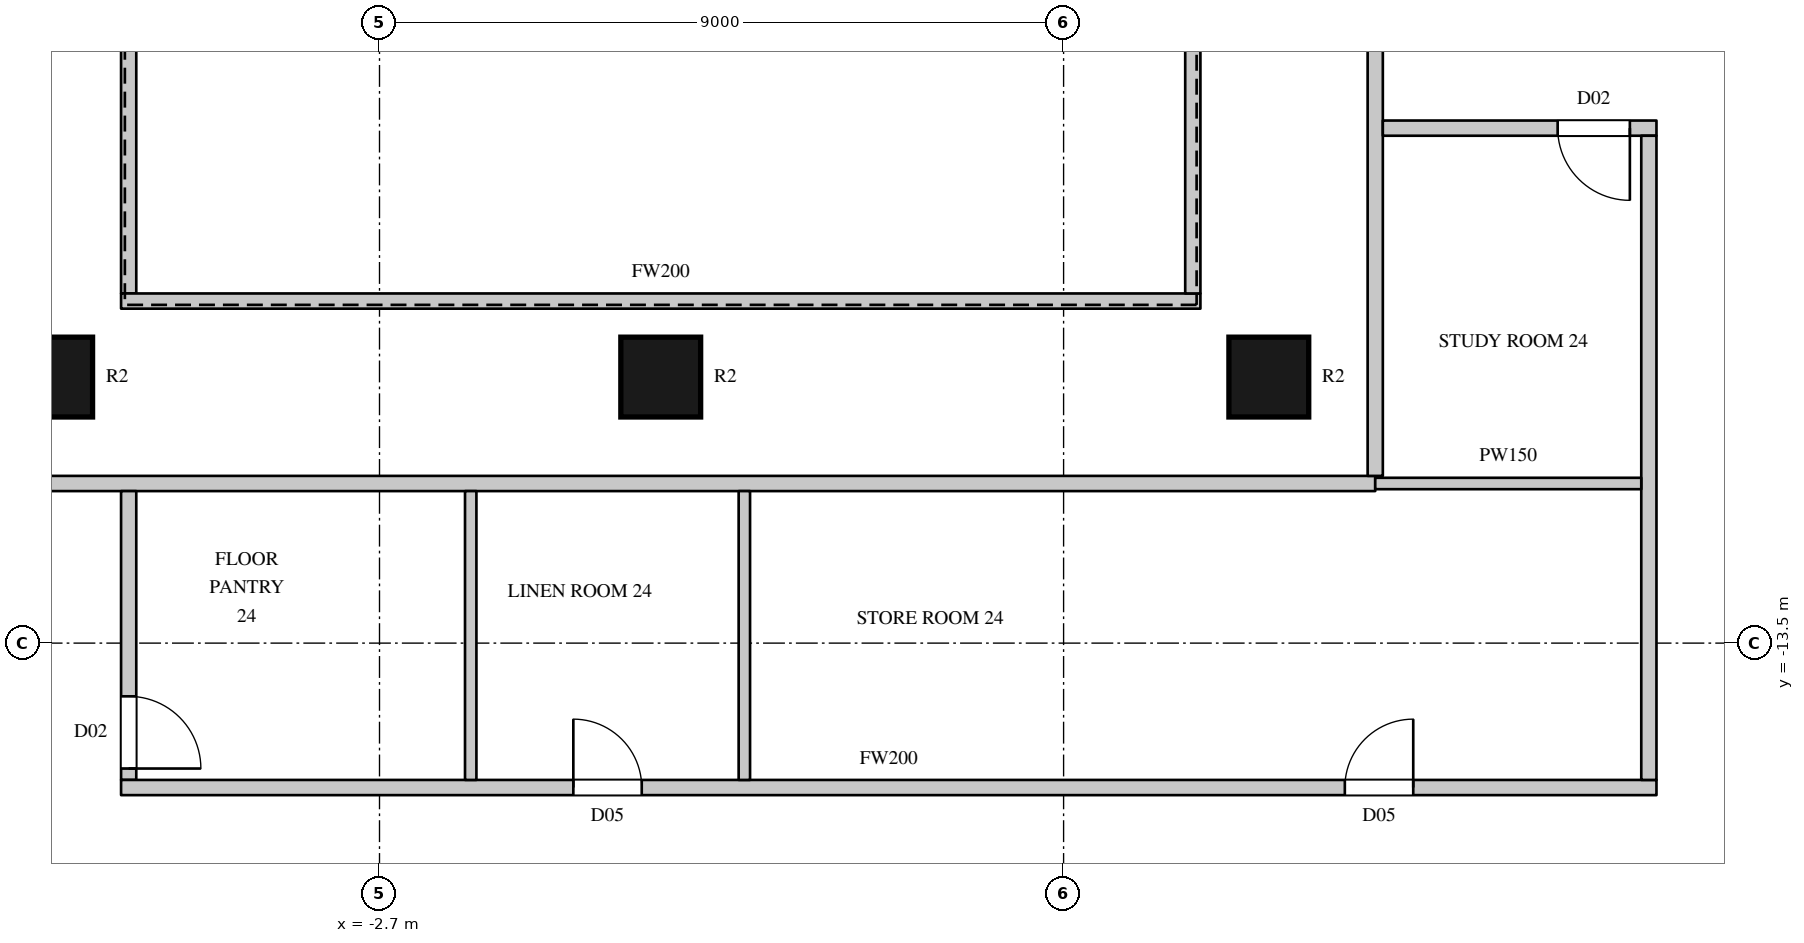
"""IFC4 building model, lengths in metres.
Left out: names, types, materials, properties, quantities, classifications, styles, units other than length and angle.
Written with IfcOpenShell. Run it as: python <this file> out.ifc"""

import sys

from ifc_helpers import new_model, si_unit, direction, frame, frame_2d, origin, origin_2d, place, context, subcontext, project, spatial, rectangle, circle, extrude, element, fill, save


model = new_model("IFC4")
c1 = context("Model", 3, precision=1e-05, world=origin(), true_north=direction((0.0, 1.0)))
c2 = subcontext(c1, "Body", "Model", "MODEL_VIEW")
j1 = project(units=[si_unit("LENGTHUNIT", "METRE"), si_unit("PLANEANGLEUNIT", "RADIAN")], contexts=[c1])
p1 = place(None, origin())
s1 = spatial("IfcSite", under=j1, at=p1, CompositionType="ELEMENT")
p2 = place(p1, origin())
s2 = spatial("IfcBuilding", under=s1, at=p2, CompositionType="ELEMENT")
p3 = place(p2, frame((0.0, 0.0, 116.7)))
s3 = spatial("IfcBuildingStorey", under=s2, at=p3, CompositionType="ELEMENT", Elevation=116.7)
for number, where, z_axis, x_axis in (
    (1, (-7.0, -10.0, 0.0), (0.0, 0.0, 1.0), (1.0, 0.0, 0.0)),
    (2, (1.0, -10.0, 0.0), (0.0, 0.0, 1.0), (1.0, 0.0, 0.0)),
    (3, (9.0, -10.0, 0.0), (0.0, 0.0, 1.0), (1.0, 0.0, 0.0)),
):
    element("IfcColumn", number, at=place(p3, frame(where, z_axis=z_axis, x_axis=x_axis)), inside=s3, PredefinedType="COLUMN", context=c2, shape_type="SweptSolid", body=[
        extrude(circle(Radius=0.525, at=origin_2d()), origin(), (0.0, 0.0, 1.0), 3.6),
    ])
p4 = place(p3, frame((-8.5, -11.4, 0.0), z_axis=(0.0, 0.0, 1.0), x_axis=(1.0, 0.0, 0.0)))
e4 = element("IfcWall", 4, at=p4, inside=s3, PredefinedType="PARTITIONING", context=c2, shape_type="SweptSolid", body=[
    extrude(rectangle(XDim=18.9, YDim=0.2, at=frame_2d((9.45, 0.0))), origin(), (0.0, 0.0, 1.0), 3.3),
])
p5 = place(p3, frame((-6.0, -15.3, 0.0), z_axis=(0.0, 0.0, 1.0), x_axis=(0.0, 1.0, 0.0)))
e5 = element("IfcWall", 5, at=p5, inside=s3, PredefinedType="PARTITIONING", context=c2, shape_type="SweptSolid", body=[
    extrude(rectangle(XDim=3.8, YDim=0.2, at=frame_2d((1.9, 0.0))), origin(), (0.0, 0.0, 1.0), 3.3),
])
p6 = place(p5, frame((0.15, 0.0, 0.0)))
e6 = element("IfcOpeningElement", 6, at=p6, cuts=e5, PredefinedType="OPENING", context=c2, shape_type="SweptSolid", body=[
    extrude(rectangle(XDim=0.95, YDim=2.2, at=frame_2d((0.475, 1.1))), frame((0.0, 0.11, 0.0), z_axis=(0.0, -1.0, 0.0), x_axis=(1.0, 0.0, 0.0)), (0.0, 0.0, 1.0), 0.22),
])
p7 = place(p3, frame((-6.1, -15.4, 0.0), z_axis=(0.0, 0.0, 1.0), x_axis=(1.0, 0.0, 0.0)))
e7 = element("IfcWall", 7, at=p7, inside=s3, PredefinedType="PARTITIONING", context=c2, shape_type="SweptSolid", body=[
    extrude(rectangle(XDim=20.2, YDim=0.2, at=frame_2d((10.1, 0.0))), origin(), (0.0, 0.0, 1.0), 3.3),
])
p8 = place(p7, frame((5.95, 0.0, 0.0)))
e8 = element("IfcOpeningElement", 8, at=p8, cuts=e7, PredefinedType="OPENING", context=c2, shape_type="SweptSolid", body=[
    extrude(rectangle(XDim=0.9, YDim=2.2, at=frame_2d((0.45, 1.1))), frame((0.0, 0.11, 0.0), z_axis=(0.0, -1.0, 0.0), x_axis=(1.0, 0.0, 0.0)), (0.0, 0.0, 1.0), 0.22),
])
p9 = place(p7, frame((16.1, 0.0, 0.0)))
e9 = element("IfcOpeningElement", 9, at=p9, cuts=e7, PredefinedType="OPENING", context=c2, shape_type="SweptSolid", body=[
    extrude(rectangle(XDim=0.9, YDim=2.2, at=frame_2d((0.45, 1.1))), frame((0.0, 0.11, 0.0), z_axis=(0.0, -1.0, 0.0), x_axis=(1.0, 0.0, 0.0)), (0.0, 0.0, 1.0), 0.22),
])
p10 = place(p3, frame((-6.0, -8.9, 0.0), z_axis=(0.0, 0.0, 1.0), x_axis=(0.0, 1.0, 0.0)))
e10 = element("IfcWall", 10, at=p10, inside=s3, PredefinedType="PARTITIONING", context=c2, shape_type="SweptSolid", body=[
    extrude(rectangle(XDim=17.8, YDim=0.2, at=frame_2d((8.9, 0.0))), origin(), (0.0, 0.0, 1.0), 3.3),
])
p11 = place(p3, frame((-6.1, -9.0, 0.0), z_axis=(0.0, 0.0, 1.0), x_axis=(1.0, 0.0, 0.0)))
e11 = element("IfcWall", 11, at=p11, inside=s3, PredefinedType="PARTITIONING", context=c2, shape_type="SweptSolid", body=[
    extrude(rectangle(XDim=14.2, YDim=0.2, at=frame_2d((7.1, 0.0))), origin(), (0.0, 0.0, 1.0), 3.3),
])
p12 = place(p3, frame((8.0, -8.9, 0.0), z_axis=(0.0, 0.0, 1.0), x_axis=(0.0, 1.0, 0.0)))
e12 = element("IfcWall", 12, at=p12, inside=s3, PredefinedType="PARTITIONING", context=c2, shape_type="SweptSolid", body=[
    extrude(rectangle(XDim=17.8, YDim=0.2, at=frame_2d((8.9, 0.0))), origin(), (0.0, 0.0, 1.0), 3.3),
])
p13 = place(p3, frame((10.4, -11.3, 0.0), z_axis=(0.0, 0.0, 1.0), x_axis=(0.0, 1.0, 0.0)))
e13 = element("IfcWall", 13, at=p13, inside=s3, PredefinedType="PARTITIONING", context=c2, shape_type="SweptSolid", body=[
    extrude(rectangle(XDim=22.6, YDim=0.2, at=frame_2d((11.3, 0.0))), origin(), (0.0, 0.0, 1.0), 3.3),
])
p14 = place(p13, frame((16.3, 0.0, 0.0)))
e14 = element("IfcOpeningElement", 14, at=p14, cuts=e13, PredefinedType="OPENING", context=c2, shape_type="SweptSolid", body=[
    extrude(rectangle(XDim=1.5, YDim=2.2, at=frame_2d((0.75, 1.1))), frame((0.0, 0.11, 0.0), z_axis=(0.0, -1.0, 0.0), x_axis=(1.0, 0.0, 0.0)), (0.0, 0.0, 1.0), 0.22),
])
p15 = place(p13, frame((14.65, 0.0, 0.0)))
e15 = element("IfcOpeningElement", 15, at=p15, cuts=e13, PredefinedType="OPENING", context=c2, shape_type="SweptSolid", body=[
    extrude(rectangle(XDim=1.5, YDim=2.2, at=frame_2d((0.75, 1.1))), frame((0.0, 0.11, 0.0), z_axis=(0.0, -1.0, 0.0), x_axis=(1.0, 0.0, 0.0)), (0.0, 0.0, 1.0), 0.22),
])
p16 = place(p13, frame((11.95, 0.0, 0.0)))
e16 = element("IfcOpeningElement", 16, at=p16, cuts=e13, PredefinedType="OPENING", context=c2, shape_type="SweptSolid", body=[
    extrude(rectangle(XDim=1.5, YDim=2.2, at=frame_2d((0.75, 1.1))), frame((0.0, 0.11, 0.0), z_axis=(0.0, -1.0, 0.0), x_axis=(1.0, 0.0, 0.0)), (0.0, 0.0, 1.0), 0.22),
])
p17 = place(p3, frame((10.5, -6.725, 0.0), z_axis=(0.0, 0.0, 1.0), x_axis=(1.0, 0.0, 0.0)))
e17 = element("IfcWall", 17, at=p17, inside=s3, PredefinedType="PARTITIONING", context=c2, shape_type="SweptSolid", body=[
    extrude(rectangle(XDim=3.6, YDim=0.2, at=frame_2d((1.8, 0.0))), origin(), (0.0, 0.0, 1.0), 3.3),
])
p18 = place(p17, frame((2.3, 0.0, 0.0)))
e18 = element("IfcOpeningElement", 18, at=p18, cuts=e17, PredefinedType="OPENING", context=c2, shape_type="SweptSolid", body=[
    extrude(rectangle(XDim=0.95, YDim=2.2, at=frame_2d((0.475, 1.1))), frame((0.0, 0.11, 0.0), z_axis=(0.0, -1.0, 0.0), x_axis=(1.0, 0.0, 0.0)), (0.0, 0.0, 1.0), 0.22),
])
p19 = place(p3, frame((14.0, -15.3, 0.0), z_axis=(0.0, 0.0, 1.0), x_axis=(0.0, 1.0, 0.0)))
e19 = element("IfcWall", 19, at=p19, inside=s3, PredefinedType="PARTITIONING", context=c2, shape_type="SweptSolid", body=[
    extrude(rectangle(XDim=8.475, YDim=0.2, at=frame_2d((4.238, 0.0))), origin(), (0.0, 0.0, 1.0), 3.3),
])
for number, where, z_axis, x_axis in (
    (20, (-1.5, -15.3, 0.0), (0.0, 0.0, 1.0), (0.0, 1.0, 0.0)),
    (21, (2.1, -15.3, 0.0), (0.0, 0.0, 1.0), (0.0, 1.0, 0.0)),
):
    element("IfcWall", number, at=place(p3, frame(where, z_axis=z_axis, x_axis=x_axis)), inside=s3, PredefinedType="PARTITIONING", context=c2, shape_type="SweptSolid", body=[
        extrude(rectangle(XDim=3.8, YDim=0.15, at=frame_2d((1.9, 0.0))), origin(), (0.0, 0.0, 1.0), 3.3),
    ])
p20 = place(p3, frame((10.4, -11.4, 0.0), z_axis=(0.0, 0.0, 1.0), x_axis=(1.0, 0.0, 0.0)))
e22 = element("IfcWall", 22, at=p20, inside=s3, PredefinedType="PARTITIONING", context=c2, shape_type="SweptSolid", body=[
    extrude(rectangle(XDim=3.5, YDim=0.15, at=frame_2d((1.75, 0.0))), origin(), (0.0, 0.0, 1.0), 3.3),
])
p21 = place(p6, origin())
e23 = element("IfcDoor", 23, at=p21, inside=s3, OperationType="SINGLE_SWING_RIGHT", PredefinedType="DOOR", context=c2, shape_type="SweptSolid", body=[
    extrude(rectangle(XDim=0.95, YDim=2.2, at=frame_2d((0.475, 1.1))), frame((0.0, 0.025, 0.0), z_axis=(0.0, -1.0, 0.0), x_axis=(1.0, 0.0, 0.0)), (0.0, 0.0, 1.0), 0.05),
])
fill(e6, e23)
p22 = place(p8, origin())
e24 = element("IfcDoor", 24, at=p22, inside=s3, OperationType="SINGLE_SWING_LEFT", PredefinedType="DOOR", context=c2, shape_type="SweptSolid", body=[
    extrude(rectangle(XDim=0.9, YDim=2.2, at=frame_2d((0.45, 1.1))), frame((0.0, 0.025, 0.0), z_axis=(0.0, -1.0, 0.0), x_axis=(1.0, 0.0, 0.0)), (0.0, 0.0, 1.0), 0.05),
])
fill(e8, e24)
p23 = place(p9, origin())
e25 = element("IfcDoor", 25, at=p23, inside=s3, OperationType="SINGLE_SWING_RIGHT", PredefinedType="DOOR", context=c2, shape_type="SweptSolid", body=[
    extrude(rectangle(XDim=0.9, YDim=2.2, at=frame_2d((0.45, 1.1))), frame((0.0, 0.025, 0.0), z_axis=(0.0, -1.0, 0.0), x_axis=(1.0, 0.0, 0.0)), (0.0, 0.0, 1.0), 0.05),
])
fill(e9, e25)
p24 = place(p18, origin())
e26 = element("IfcDoor", 26, at=p24, inside=s3, OperationType="SINGLE_SWING_LEFT", PredefinedType="DOOR", context=c2, shape_type="SweptSolid", body=[
    extrude(rectangle(XDim=0.95, YDim=2.2, at=frame_2d((0.475, 1.1))), frame((0.0, 0.025, 0.0), z_axis=(0.0, -1.0, 0.0), x_axis=(1.0, 0.0, 0.0)), (0.0, 0.0, 1.0), 0.05),
])
fill(e18, e26)
save(model, sys.argv[1])
